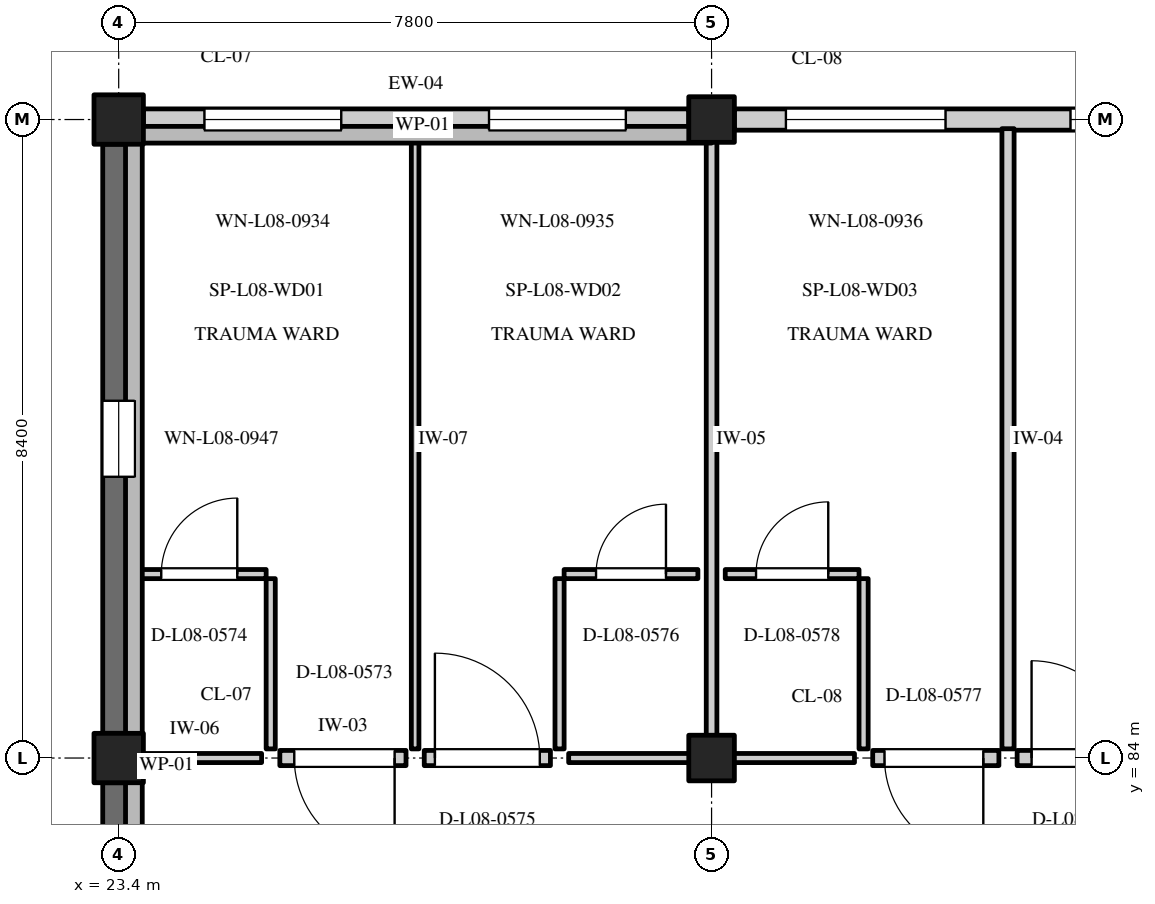
"""IFC4 building model, lengths in metres.
Left out: names, types, materials, properties, quantities, classifications, styles, units other than length and angle.
Written with IfcOpenShell. Run it as: python <this file> out.ifc"""

import sys

from ifc_helpers import new_model, si_unit, direction, frame, frame_2d, origin, origin_2d, place, context, subcontext, project, spatial, rectangle, extrude, element, fill, save


model = new_model("IFC4")
c1 = context("Model", 3, precision=1e-05, world=origin(), true_north=direction((0.0, 1.0)))
c2 = subcontext(c1, "Body", "Model", "MODEL_VIEW")
j1 = project(units=[si_unit("LENGTHUNIT", "METRE"), si_unit("PLANEANGLEUNIT", "RADIAN")], contexts=[c1])
p1 = place(None, origin())
s1 = spatial("IfcSite", under=j1, at=p1, CompositionType="ELEMENT")
p2 = place(p1, origin())
s2 = spatial("IfcBuilding", under=s1, at=p2, CompositionType="ELEMENT")
p3 = place(p2, frame((0.0, 0.0, 33.9)))
s3 = spatial("IfcBuildingStorey", under=s2, at=p3, CompositionType="ELEMENT", Elevation=33.9)
for number, where, z_axis, x_axis in (
    (1, (23.4, 84.0, 0.0), (0.0, 0.0, 1.0), (1.0, 0.0, 0.0)),
    (2, (23.4, 92.4, 0.0), (0.0, 0.0, 1.0), (1.0, 0.0, 0.0)),
):
    element("IfcColumn", number, at=place(p3, frame(where, z_axis=z_axis, x_axis=x_axis)), inside=s3, PredefinedType="COLUMN", context=c2, shape_type="SweptSolid", body=[
        extrude(rectangle(XDim=0.65, YDim=0.65, at=origin_2d()), origin(), (0.0, 0.0, 1.0), 3.9),
    ])
for number, where, z_axis, x_axis in (
    (3, (31.2, 84.0, 0.0), (0.0, 0.0, 1.0), (1.0, 0.0, 0.0)),
    (4, (31.2, 92.4, 0.0), (0.0, 0.0, 1.0), (1.0, 0.0, 0.0)),
):
    element("IfcColumn", number, at=place(p3, frame(where, z_axis=z_axis, x_axis=x_axis)), inside=s3, PredefinedType="COLUMN", context=c2, shape_type="SweptSolid", body=[
        extrude(rectangle(XDim=0.6, YDim=0.6, at=origin_2d()), origin(), (0.0, 0.0, 1.0), 3.9),
    ])
p4 = place(p3, frame((23.725, 92.4, 0.0), z_axis=(0.0, 0.0, 1.0), x_axis=(1.0, 0.0, 0.0)))
e5 = element("IfcWall", 5, at=p4, inside=s3, PredefinedType="STANDARD", context=c2, shape_type="SweptSolid", body=[
    extrude(rectangle(XDim=7.175, YDim=0.28, at=frame_2d((3.587, 0.0))), origin(), (0.0, 0.0, 1.0), 3.05),
])
p5 = place(p4, frame((0.803, 0.0, 0.8)))
e6 = element("IfcOpeningElement", 6, at=p5, cuts=e5, PredefinedType="OPENING", context=c2, shape_type="SweptSolid", body=[
    extrude(rectangle(XDim=1.8, YDim=1.45, at=frame_2d((0.9, 0.725))), frame((0.0, 0.152, 0.0), z_axis=(0.0, -1.0, 0.0), x_axis=(1.0, 0.0, 0.0)), (0.0, 0.0, 1.0), 0.304),
])
p6 = place(p4, frame((4.547, 0.0, 0.8)))
e7 = element("IfcOpeningElement", 7, at=p6, cuts=e5, PredefinedType="OPENING", context=c2, shape_type="SweptSolid", body=[
    extrude(rectangle(XDim=1.8, YDim=1.45, at=frame_2d((0.9, 0.725))), frame((0.0, 0.152, 0.0), z_axis=(0.0, -1.0, 0.0), x_axis=(1.0, 0.0, 0.0)), (0.0, 0.0, 1.0), 0.304),
])
p7 = place(p3, frame((31.5, 92.4, 0.0), z_axis=(0.0, 0.0, 1.0), x_axis=(1.0, 0.0, 0.0)))
e8 = element("IfcWall", 8, at=p7, inside=s3, PredefinedType="STANDARD", context=c2, shape_type="SweptSolid", body=[
    extrude(rectangle(XDim=7.2, YDim=0.28, at=frame_2d((3.6, 0.0))), origin(), (0.0, 0.0, 1.0), 3.05),
])
p8 = place(p7, frame((0.678, 0.0, 0.8)))
e9 = element("IfcOpeningElement", 9, at=p8, cuts=e8, PredefinedType="OPENING", context=c2, shape_type="SweptSolid", body=[
    extrude(rectangle(XDim=2.1, YDim=1.75, at=frame_2d((1.05, 0.875))), frame((0.0, 0.152, 0.0), z_axis=(0.0, -1.0, 0.0), x_axis=(1.0, 0.0, 0.0)), (0.0, 0.0, 1.0), 0.304),
])
p9 = place(p7, frame((4.422, 0.0, 0.8)))
e10 = element("IfcOpeningElement", 10, at=p9, cuts=e8, PredefinedType="OPENING", context=c2, shape_type="SweptSolid", body=[
    extrude(rectangle(XDim=2.1, YDim=1.75, at=frame_2d((1.05, 0.875))), frame((0.0, 0.152, 0.0), z_axis=(0.0, -1.0, 0.0), x_axis=(1.0, 0.0, 0.0)), (0.0, 0.0, 1.0), 0.304),
])
p10 = place(p3, frame((23.4, 75.925, 0.0), z_axis=(0.0, 0.0, 1.0), x_axis=(0.0, 1.0, 0.0)))
e11 = element("IfcWall", 11, at=p10, inside=s3, PredefinedType="SOLIDWALL", context=c2, shape_type="SweptSolid", body=[
    extrude(rectangle(XDim=7.75, YDim=0.42, at=frame_2d((3.875, 0.0))), origin(), (0.0, 0.0, 1.0), 2.95),
])
p11 = place(p10, frame((3.425, 0.0, 0.8)))
e12 = element("IfcOpeningElement", 12, at=p11, cuts=e11, PredefinedType="OPENING", context=c2, shape_type="SweptSolid", body=[
    extrude(rectangle(XDim=0.9, YDim=1.3, at=frame_2d((0.45, 0.65))), frame((0.0, 0.222, 0.0), z_axis=(0.0, -1.0, 0.0), x_axis=(1.0, 0.0, 0.0)), (0.0, 0.0, 1.0), 0.444),
])
p12 = place(p3, frame((23.4, 84.325, 0.0), z_axis=(0.0, 0.0, 1.0), x_axis=(0.0, 1.0, 0.0)))
e13 = element("IfcWall", 13, at=p12, inside=s3, PredefinedType="SOLIDWALL", context=c2, shape_type="SweptSolid", body=[
    extrude(rectangle(XDim=7.75, YDim=0.42, at=frame_2d((3.875, 0.0))), origin(), (0.0, 0.0, 1.0), 2.95),
])
p13 = place(p12, frame((3.375, 0.0, 0.8)))
e14 = element("IfcOpeningElement", 14, at=p13, cuts=e13, PredefinedType="OPENING", context=c2, shape_type="SweptSolid", body=[
    extrude(rectangle(XDim=1.0, YDim=1.45, at=frame_2d((0.5, 0.725))), frame((0.0, 0.222, 0.0), z_axis=(0.0, -1.0, 0.0), x_axis=(1.0, 0.0, 0.0)), (0.0, 0.0, 1.0), 0.444),
])
p14 = place(p3, frame((23.6, 75.6, 3.9), z_axis=(0.0, 0.0, 1.0), x_axis=(0.0, 1.0, 0.0)))
e15 = element("IfcWall", 15, at=p14, inside=s3, PredefinedType="PARAPET", context=c2, shape_type="SweptSolid", body=[
    extrude(rectangle(XDim=16.6, YDim=0.22, at=frame_2d((8.3, 0.0))), origin(), (0.0, 0.0, 1.0), 1.15),
])
p15 = place(p3, frame((23.6, 92.2, 3.9), z_axis=(0.0, 0.0, 1.0), x_axis=(1.0, 0.0, 0.0)))
e16 = element("IfcWall", 16, at=p15, inside=s3, PredefinedType="PARAPET", context=c2, shape_type="SweptSolid", body=[
    extrude(rectangle(XDim=7.6, YDim=0.22, at=frame_2d((3.8, 0.0))), origin(), (0.0, 0.0, 1.0), 1.15),
])
p16 = place(p3, frame((27.3, 84.12, 0.0), z_axis=(0.0, 0.0, 1.0), x_axis=(0.0, 1.0, 0.0)))
e17 = element("IfcWall", 17, at=p16, inside=s3, PredefinedType="PARTITIONING", context=c2, shape_type="SweptSolid", body=[
    extrude(rectangle(XDim=8.16, YDim=0.1, at=frame_2d((4.08, 0.0))), origin(), (0.0, 0.0, 1.0), 3.58),
])
p17 = place(p3, frame((25.52, 84.0, 0.0), z_axis=(0.0, 0.0, 1.0), x_axis=(1.0, 0.0, 0.0)))
e18 = element("IfcWall", 18, at=p17, inside=s3, PredefinedType="STANDARD", context=c2, shape_type="SweptSolid", body=[
    extrude(rectangle(XDim=1.66, YDim=0.2, at=frame_2d((0.83, 0.0))), origin(), (0.0, 0.0, 1.0), 2.95),
])
p18 = place(p17, frame((0.19, 0.0, 0.0)))
e19 = element("IfcOpeningElement", 19, at=p18, cuts=e18, PredefinedType="OPENING", context=c2, shape_type="SweptSolid", body=[
    extrude(rectangle(XDim=1.32, YDim=2.2, at=frame_2d((0.66, 1.1))), frame((0.0, 0.112, 0.0), z_axis=(0.0, -1.0, 0.0), x_axis=(1.0, 0.0, 0.0)), (0.0, 0.0, 1.0), 0.224),
])
p19 = place(p3, frame((23.52, 84.0, 0.0), z_axis=(0.0, 0.0, 1.0), x_axis=(1.0, 0.0, 0.0)))
e20 = element("IfcWall", 20, at=p19, inside=s3, PredefinedType="PARTITIONING", context=c2, shape_type="SweptSolid", body=[
    extrude(rectangle(XDim=1.76, YDim=0.12, at=frame_2d((0.88, 0.0))), origin(), (0.0, 0.0, 1.0), 2.95),
])
p20 = place(p3, frame((25.4, 84.12, 0.0), z_axis=(0.0, 0.0, 1.0), x_axis=(0.0, 1.0, 0.0)))
e21 = element("IfcWall", 21, at=p20, inside=s3, PredefinedType="PARTITIONING", context=c2, shape_type="SweptSolid", body=[
    extrude(rectangle(XDim=2.24, YDim=0.12, at=frame_2d((1.12, 0.0))), origin(), (0.0, 0.0, 1.0), 3.58),
])
p21 = place(p3, frame((23.58, 86.42, 0.0), z_axis=(0.0, 0.0, 1.0), x_axis=(1.0, 0.0, 0.0)))
e22 = element("IfcWall", 22, at=p21, inside=s3, PredefinedType="PARTITIONING", context=c2, shape_type="SweptSolid", body=[
    extrude(rectangle(XDim=1.76, YDim=0.12, at=frame_2d((0.88, 0.0))), origin(), (0.0, 0.0, 1.0), 3.58),
])
p22 = place(p21, frame((0.38, 0.0, 0.0)))
e23 = element("IfcOpeningElement", 23, at=p22, cuts=e22, PredefinedType="OPENING", context=c2, shape_type="SweptSolid", body=[
    extrude(rectangle(XDim=1.0, YDim=2.1, at=frame_2d((0.5, 1.05))), frame((0.0, 0.072, 0.0), z_axis=(0.0, -1.0, 0.0), x_axis=(1.0, 0.0, 0.0)), (0.0, 0.0, 1.0), 0.144),
])
p23 = place(p3, frame((31.2, 84.12, 0.0), z_axis=(0.0, 0.0, 1.0), x_axis=(0.0, 1.0, 0.0)))
e24 = element("IfcWall", 24, at=p23, inside=s3, PredefinedType="PARTITIONING", context=c2, shape_type="SweptSolid", body=[
    extrude(rectangle(XDim=8.16, YDim=0.14, at=frame_2d((4.08, 0.0))), origin(), (0.0, 0.0, 1.0), 3.58),
])
p24 = place(p3, frame((27.42, 84.0, 0.0), z_axis=(0.0, 0.0, 1.0), x_axis=(1.0, 0.0, 0.0)))
e25 = element("IfcWall", 25, at=p24, inside=s3, PredefinedType="STANDARD", context=c2, shape_type="SweptSolid", body=[
    extrude(rectangle(XDim=1.66, YDim=0.2, at=frame_2d((0.83, 0.0))), origin(), (0.0, 0.0, 1.0), 2.95),
])
p25 = place(p24, frame((0.14, 0.0, 0.0)))
e26 = element("IfcOpeningElement", 26, at=p25, cuts=e25, PredefinedType="OPENING", context=c2, shape_type="SweptSolid", body=[
    extrude(rectangle(XDim=1.38, YDim=2.2, at=frame_2d((0.69, 1.1))), frame((0.0, 0.112, 0.0), z_axis=(0.0, -1.0, 0.0), x_axis=(1.0, 0.0, 0.0)), (0.0, 0.0, 1.0), 0.224),
])
p26 = place(p3, frame((29.32, 84.0, 0.0), z_axis=(0.0, 0.0, 1.0), x_axis=(1.0, 0.0, 0.0)))
e27 = element("IfcWall", 27, at=p26, inside=s3, PredefinedType="PARTITIONING", context=c2, shape_type="SweptSolid", body=[
    extrude(rectangle(XDim=1.76, YDim=0.12, at=frame_2d((0.88, 0.0))), origin(), (0.0, 0.0, 1.0), 2.95),
])
p27 = place(p3, frame((29.2, 84.12, 0.0), z_axis=(0.0, 0.0, 1.0), x_axis=(0.0, 1.0, 0.0)))
e28 = element("IfcWall", 28, at=p27, inside=s3, PredefinedType="PARTITIONING", context=c2, shape_type="SweptSolid", body=[
    extrude(rectangle(XDim=2.24, YDim=0.12, at=frame_2d((1.12, 0.0))), origin(), (0.0, 0.0, 1.0), 3.58),
])
p28 = place(p3, frame((29.26, 86.42, 0.0), z_axis=(0.0, 0.0, 1.0), x_axis=(1.0, 0.0, 0.0)))
e29 = element("IfcWall", 29, at=p28, inside=s3, PredefinedType="PARTITIONING", context=c2, shape_type="SweptSolid", body=[
    extrude(rectangle(XDim=1.76, YDim=0.12, at=frame_2d((0.88, 0.0))), origin(), (0.0, 0.0, 1.0), 3.58),
])
p29 = place(p28, frame((0.42, 0.0, 0.0)))
e30 = element("IfcOpeningElement", 30, at=p29, cuts=e29, PredefinedType="OPENING", context=c2, shape_type="SweptSolid", body=[
    extrude(rectangle(XDim=0.92, YDim=2.08, at=frame_2d((0.46, 1.04))), frame((0.0, 0.072, 0.0), z_axis=(0.0, -1.0, 0.0), x_axis=(1.0, 0.0, 0.0)), (0.0, 0.0, 1.0), 0.144),
])
p30 = place(p3, frame((35.1, 84.12, 0.0), z_axis=(0.0, 0.0, 1.0), x_axis=(0.0, 1.0, 0.0)))
e31 = element("IfcWall", 31, at=p30, inside=s3, PredefinedType="PARTITIONING", context=c2, shape_type="SweptSolid", body=[
    extrude(rectangle(XDim=8.16, YDim=0.16, at=frame_2d((4.08, 0.0))), origin(), (0.0, 0.0, 1.0), 3.58),
])
p31 = place(p3, frame((33.32, 84.0, 0.0), z_axis=(0.0, 0.0, 1.0), x_axis=(1.0, 0.0, 0.0)))
e32 = element("IfcWall", 32, at=p31, inside=s3, PredefinedType="STANDARD", context=c2, shape_type="SweptSolid", body=[
    extrude(rectangle(XDim=1.66, YDim=0.2, at=frame_2d((0.83, 0.0))), origin(), (0.0, 0.0, 1.0), 2.95),
])
p32 = place(p31, frame((0.155, 0.0, 0.0)))
e33 = element("IfcOpeningElement", 33, at=p32, cuts=e32, PredefinedType="OPENING", context=c2, shape_type="SweptSolid", body=[
    extrude(rectangle(XDim=1.3, YDim=2.15, at=frame_2d((0.65, 1.075))), frame((0.0, 0.112, 0.0), z_axis=(0.0, -1.0, 0.0), x_axis=(1.0, 0.0, 0.0)), (0.0, 0.0, 1.0), 0.224),
])
p33 = place(p3, frame((31.32, 84.0, 0.0), z_axis=(0.0, 0.0, 1.0), x_axis=(1.0, 0.0, 0.0)))
e34 = element("IfcWall", 34, at=p33, inside=s3, PredefinedType="PARTITIONING", context=c2, shape_type="SweptSolid", body=[
    extrude(rectangle(XDim=1.76, YDim=0.12, at=frame_2d((0.88, 0.0))), origin(), (0.0, 0.0, 1.0), 2.95),
])
p34 = place(p3, frame((33.2, 84.12, 0.0), z_axis=(0.0, 0.0, 1.0), x_axis=(0.0, 1.0, 0.0)))
e35 = element("IfcWall", 35, at=p34, inside=s3, PredefinedType="PARTITIONING", context=c2, shape_type="SweptSolid", body=[
    extrude(rectangle(XDim=2.24, YDim=0.12, at=frame_2d((1.12, 0.0))), origin(), (0.0, 0.0, 1.0), 3.58),
])
p35 = place(p3, frame((31.38, 86.42, 0.0), z_axis=(0.0, 0.0, 1.0), x_axis=(1.0, 0.0, 0.0)))
e36 = element("IfcWall", 36, at=p35, inside=s3, PredefinedType="PARTITIONING", context=c2, shape_type="SweptSolid", body=[
    extrude(rectangle(XDim=1.76, YDim=0.12, at=frame_2d((0.88, 0.0))), origin(), (0.0, 0.0, 1.0), 3.58),
])
p36 = place(p35, frame((0.405, 0.0, 0.0)))
e37 = element("IfcOpeningElement", 37, at=p36, cuts=e36, PredefinedType="OPENING", context=c2, shape_type="SweptSolid", body=[
    extrude(rectangle(XDim=0.95, YDim=2.1, at=frame_2d((0.475, 1.05))), frame((0.0, 0.072, 0.0), z_axis=(0.0, -1.0, 0.0), x_axis=(1.0, 0.0, 0.0)), (0.0, 0.0, 1.0), 0.144),
])
p37 = place(p3, frame((35.22, 84.0, 0.0), z_axis=(0.0, 0.0, 1.0), x_axis=(1.0, 0.0, 0.0)))
e38 = element("IfcWall", 38, at=p37, inside=s3, PredefinedType="STANDARD", context=c2, shape_type="SweptSolid", body=[
    extrude(rectangle(XDim=1.66, YDim=0.2, at=frame_2d((0.83, 0.0))), origin(), (0.0, 0.0, 1.0), 2.95),
])
p38 = place(p37, frame((0.19, 0.0, 0.0)))
e39 = element("IfcOpeningElement", 39, at=p38, cuts=e38, PredefinedType="OPENING", context=c2, shape_type="SweptSolid", body=[
    extrude(rectangle(XDim=1.28, YDim=2.15, at=frame_2d((0.64, 1.075))), frame((0.0, 0.112, 0.0), z_axis=(0.0, -1.0, 0.0), x_axis=(1.0, 0.0, 0.0)), (0.0, 0.0, 1.0), 0.224),
])
p39 = place(p5, origin())
e40 = element("IfcWindow", 40, at=p39, inside=s3, PartitioningType="DOUBLE_PANEL_VERTICAL", PredefinedType="WINDOW", context=c2, shape_type="SweptSolid", body=[
    extrude(rectangle(XDim=1.8, YDim=1.45, at=frame_2d((0.9, 0.725))), frame((0.0, 0.03, 0.0), z_axis=(0.0, -1.0, 0.0), x_axis=(1.0, 0.0, 0.0)), (0.0, 0.0, 1.0), 0.06),
])
fill(e6, e40)
p40 = place(p6, origin())
e41 = element("IfcWindow", 41, at=p40, inside=s3, PartitioningType="DOUBLE_PANEL_VERTICAL", PredefinedType="WINDOW", context=c2, shape_type="SweptSolid", body=[
    extrude(rectangle(XDim=1.8, YDim=1.45, at=frame_2d((0.9, 0.725))), frame((0.0, 0.03, 0.0), z_axis=(0.0, -1.0, 0.0), x_axis=(1.0, 0.0, 0.0)), (0.0, 0.0, 1.0), 0.06),
])
fill(e7, e41)
p41 = place(p8, origin())
e42 = element("IfcWindow", 42, at=p41, inside=s3, PartitioningType="DOUBLE_PANEL_VERTICAL", PredefinedType="WINDOW", context=c2, shape_type="SweptSolid", body=[
    extrude(rectangle(XDim=2.1, YDim=1.75, at=frame_2d((1.05, 0.875))), frame((0.0, 0.03, 0.0), z_axis=(0.0, -1.0, 0.0), x_axis=(1.0, 0.0, 0.0)), (0.0, 0.0, 1.0), 0.06),
])
fill(e9, e42)
p42 = place(p9, origin())
e43 = element("IfcWindow", 43, at=p42, inside=s3, PartitioningType="DOUBLE_PANEL_VERTICAL", PredefinedType="WINDOW", context=c2, shape_type="SweptSolid", body=[
    extrude(rectangle(XDim=2.1, YDim=1.75, at=frame_2d((1.05, 0.875))), frame((0.0, 0.03, 0.0), z_axis=(0.0, -1.0, 0.0), x_axis=(1.0, 0.0, 0.0)), (0.0, 0.0, 1.0), 0.06),
])
fill(e10, e43)
p43 = place(p13, origin())
e44 = element("IfcWindow", 44, at=p43, inside=s3, PartitioningType="SINGLE_PANEL", PredefinedType="WINDOW", context=c2, shape_type="SweptSolid", body=[
    extrude(rectangle(XDim=1.0, YDim=1.45, at=frame_2d((0.5, 0.725))), frame((0.0, 0.03, 0.0), z_axis=(0.0, -1.0, 0.0), x_axis=(1.0, 0.0, 0.0)), (0.0, 0.0, 1.0), 0.06),
])
fill(e14, e44)
p44 = place(p18, origin())
e45 = element("IfcDoor", 45, at=p44, inside=s3, OperationType="SINGLE_SWING_RIGHT", PredefinedType="DOOR", context=c2, shape_type="SweptSolid", body=[
    extrude(rectangle(XDim=1.32, YDim=2.2, at=frame_2d((0.66, 1.1))), frame((0.0, 0.025, 0.0), z_axis=(0.0, -1.0, 0.0), x_axis=(1.0, 0.0, 0.0)), (0.0, 0.0, 1.0), 0.05),
])
fill(e19, e45)
p45 = place(p22, frame((1.0, 0.0, 0.0), z_axis=(0.0, 0.0, 1.0), x_axis=(-1.0, 0.0, 0.0)))
e46 = element("IfcDoor", 46, at=p45, inside=s3, OperationType="SINGLE_SWING_LEFT", PredefinedType="DOOR", context=c2, shape_type="SweptSolid", body=[
    extrude(rectangle(XDim=1.0, YDim=2.1, at=frame_2d((0.5, 1.05))), frame((0.0, 0.025, 0.0), z_axis=(0.0, -1.0, 0.0), x_axis=(1.0, 0.0, 0.0)), (0.0, 0.0, 1.0), 0.05),
])
fill(e23, e46)
p46 = place(p25, origin())
e47 = element("IfcDoor", 47, at=p46, inside=s3, OperationType="SINGLE_SWING_LEFT", PredefinedType="DOOR", context=c2, shape_type="SweptSolid", body=[
    extrude(rectangle(XDim=1.38, YDim=2.2, at=frame_2d((0.69, 1.1))), frame((0.0, 0.025, 0.0), z_axis=(0.0, -1.0, 0.0), x_axis=(1.0, 0.0, 0.0)), (0.0, 0.0, 1.0), 0.05),
])
fill(e26, e47)
p47 = place(p29, frame((0.92, 0.0, 0.0), z_axis=(0.0, 0.0, 1.0), x_axis=(-1.0, 0.0, 0.0)))
e48 = element("IfcDoor", 48, at=p47, inside=s3, OperationType="SINGLE_SWING_LEFT", PredefinedType="DOOR", context=c2, shape_type="SweptSolid", body=[
    extrude(rectangle(XDim=0.92, YDim=2.08, at=frame_2d((0.46, 1.04))), frame((0.0, 0.025, 0.0), z_axis=(0.0, -1.0, 0.0), x_axis=(1.0, 0.0, 0.0)), (0.0, 0.0, 1.0), 0.05),
])
fill(e30, e48)
p48 = place(p32, origin())
e49 = element("IfcDoor", 49, at=p48, inside=s3, OperationType="SINGLE_SWING_RIGHT", PredefinedType="DOOR", context=c2, shape_type="SweptSolid", body=[
    extrude(rectangle(XDim=1.3, YDim=2.15, at=frame_2d((0.65, 1.075))), frame((0.0, 0.025, 0.0), z_axis=(0.0, -1.0, 0.0), x_axis=(1.0, 0.0, 0.0)), (0.0, 0.0, 1.0), 0.05),
])
fill(e33, e49)
p49 = place(p36, frame((0.95, 0.0, 0.0), z_axis=(0.0, 0.0, 1.0), x_axis=(-1.0, 0.0, 0.0)))
e50 = element("IfcDoor", 50, at=p49, inside=s3, OperationType="SINGLE_SWING_LEFT", PredefinedType="DOOR", context=c2, shape_type="SweptSolid", body=[
    extrude(rectangle(XDim=0.95, YDim=2.1, at=frame_2d((0.475, 1.05))), frame((0.0, 0.025, 0.0), z_axis=(0.0, -1.0, 0.0), x_axis=(1.0, 0.0, 0.0)), (0.0, 0.0, 1.0), 0.05),
])
fill(e37, e50)
p50 = place(p38, origin())
e51 = element("IfcDoor", 51, at=p50, inside=s3, OperationType="SINGLE_SWING_LEFT", PredefinedType="DOOR", context=c2, shape_type="SweptSolid", body=[
    extrude(rectangle(XDim=1.28, YDim=2.15, at=frame_2d((0.64, 1.075))), frame((0.0, 0.025, 0.0), z_axis=(0.0, -1.0, 0.0), x_axis=(1.0, 0.0, 0.0)), (0.0, 0.0, 1.0), 0.05),
])
fill(e39, e51)
save(model, sys.argv[1])
